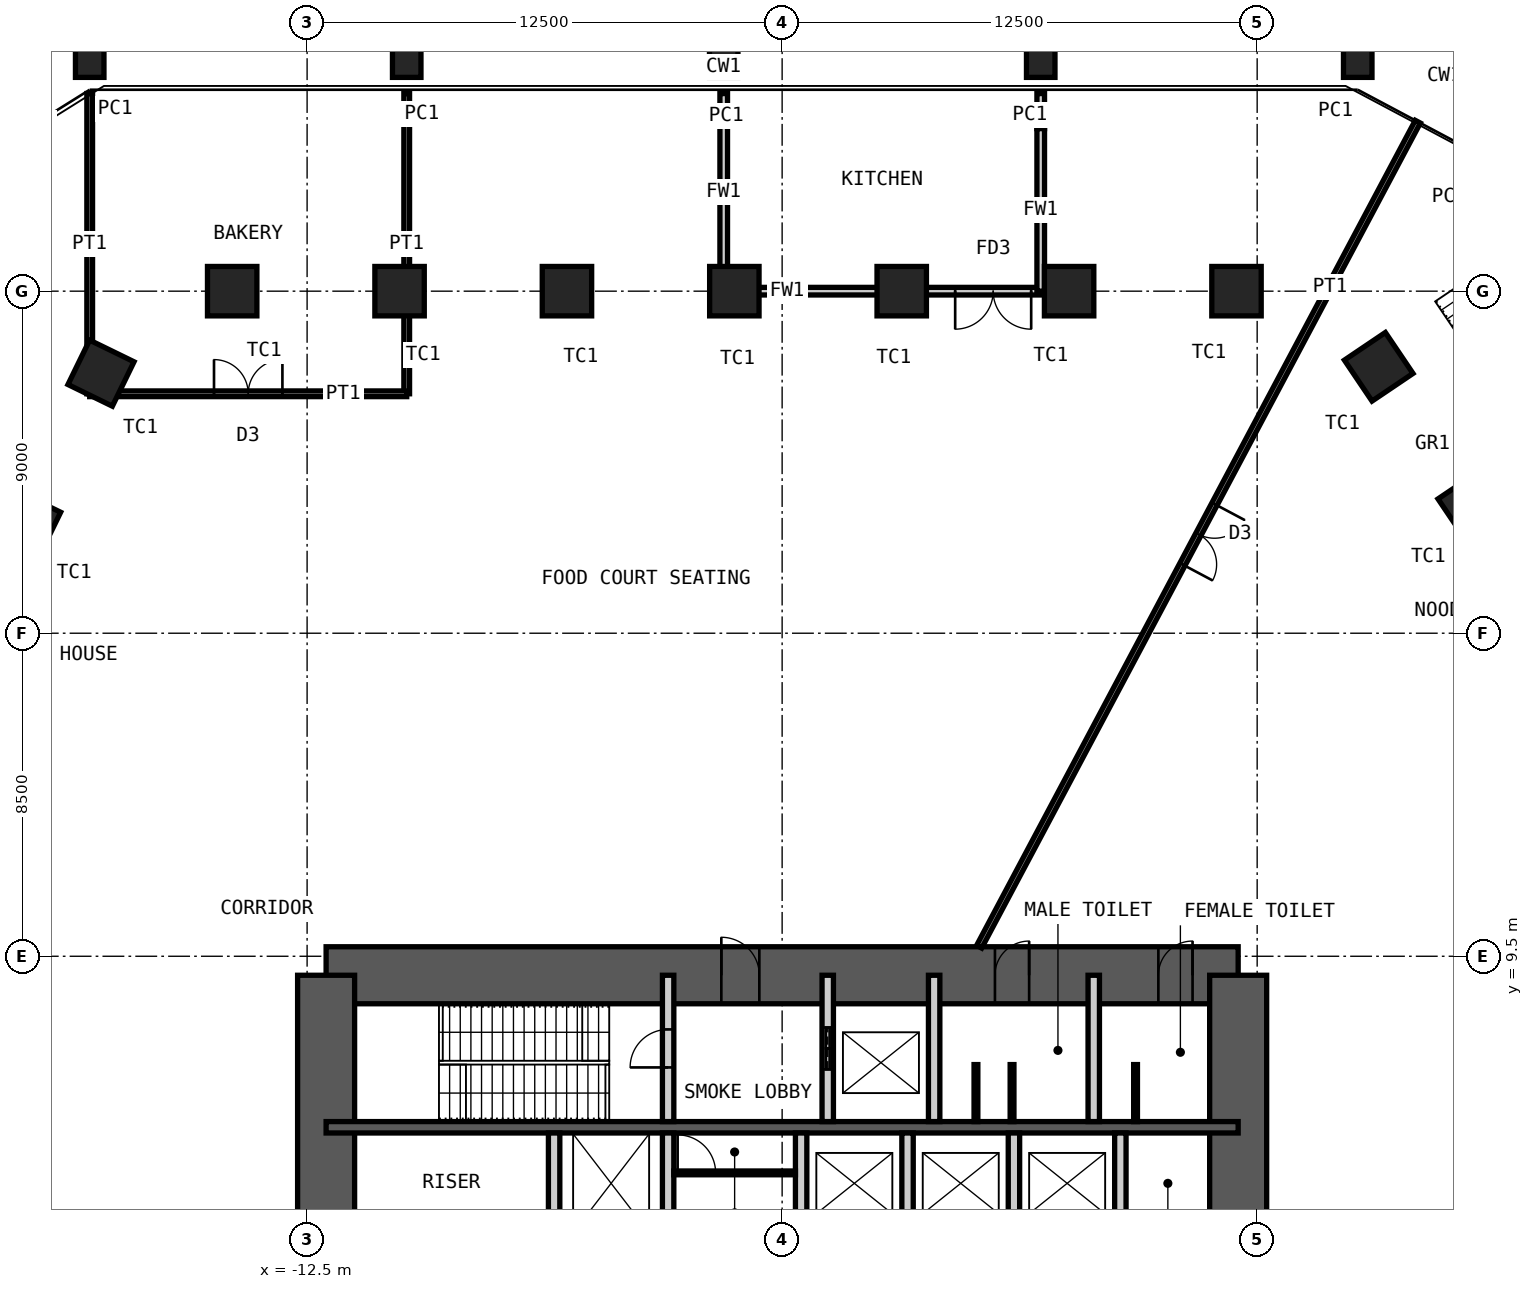
"""IFC4 building model, lengths in metres.
Left out: names, types, materials, properties, quantities, classifications, styles, units other than length and angle.
Written with IfcOpenShell. Run it as: python <this file> out.ifc"""

import sys

from ifc_helpers import new_model, si_unit, direction, frame, frame_2d, origin, origin_2d, place, context, subcontext, project, spatial, rectangle, hollow_rectangle, extrude, element, fill, save


model = new_model("IFC4")
c1 = context("Model", 3, precision=1e-05, world=origin(), true_north=direction((0.0, 1.0)))
c2 = subcontext(c1, "Body", "Model", "MODEL_VIEW")
j1 = project(units=[si_unit("LENGTHUNIT", "METRE"), si_unit("PLANEANGLEUNIT", "RADIAN")], contexts=[c1])
p1 = place(None, origin())
s1 = spatial("IfcSite", under=j1, at=p1, CompositionType="ELEMENT")
p2 = place(p1, origin())
s2 = spatial("IfcBuilding", under=s1, at=p2, CompositionType="ELEMENT")
p3 = place(p2, frame((0.0, 0.0, 6.0)))
s3 = spatial("IfcBuildingStorey", under=s2, at=p3, CompositionType="ELEMENT", Elevation=6.0)
for number, where, z_axis, x_axis in (
    (1, (-14.471, 27.0, 0.0), (0.0, 0.0, 1.0), (-1.0, 0.0, 0.0)),
    (2, (-10.067, 27.0, 0.0), (0.0, 0.0, 1.0), (-1.0, 0.0, 0.0)),
    (3, (-5.662, 27.0, 0.0), (0.0, 0.0, 1.0), (-1.0, 0.0, 0.0)),
    (4, (-1.258, 27.0, 0.0), (0.0, 0.0, 1.0), (-1.0, 0.0, 0.0)),
    (5, (3.147, 27.0, 0.0), (0.0, 0.0, 1.0), (-1.0, 0.0, 0.0)),
    (6, (7.552, 27.0, 0.0), (0.0, 0.0, 1.0), (-1.0, 0.0, 0.0)),
    (7, (11.956, 27.0, 0.0), (0.0, 0.0, 1.0), (-1.0, 0.0, 0.0)),
    (8, (15.698, 25.01, 0.0), (0.0, 0.0, 1.0), (-0.559, 0.829, 0.0)),
    (9, (18.161, 21.359, 0.0), (0.0, 0.0, 1.0), (-0.559, 0.829, 0.0)),
    (10, (-19.854, 20.884, 0.0), (0.0, 0.0, 1.0), (-0.438, -0.899, 0.0)),
    (11, (-17.924, 24.843, 0.0), (0.0, 0.0, 1.0), (-0.438, -0.899, 0.0)),
):
    element("IfcColumn", number, at=place(p3, frame(where, z_axis=z_axis, x_axis=x_axis)), inside=s3, PredefinedType="COLUMN", context=c2, shape_type="SweptSolid", body=[
        extrude(hollow_rectangle(XDim=1.3, YDim=1.3, WallThickness=0.1, at=origin_2d()), origin(), (0.0, 0.0, 1.0), 6.0),
    ])
for number, where, z_axis, x_axis in (
    (12, (-18.221, 33.0, 0.0), (0.0, 0.0, 1.0), (-1.0, 0.0, 0.0)),
    (13, (-9.879, 33.0, 0.0), (0.0, 0.0, 1.0), (-1.0, 0.0, 0.0)),
    (14, (-1.537, 33.0, 0.0), (0.0, 0.0, 1.0), (-1.0, 0.0, 0.0)),
    (15, (6.805, 33.0, 0.0), (0.0, 0.0, 1.0), (-1.0, 0.0, 0.0)),
    (16, (15.146, 33.0, 0.0), (0.0, 0.0, 1.0), (-1.0, 0.0, 0.0)),
):
    element("IfcColumn", number, at=place(p3, frame(where, z_axis=z_axis, x_axis=x_axis)), inside=s3, PredefinedType="COLUMN", context=c2, shape_type="SweptSolid", body=[
        extrude(hollow_rectangle(XDim=0.75, YDim=0.75, WallThickness=0.036, at=origin_2d()), origin(), (0.0, 0.0, 1.0), 6.0),
    ])
p4 = place(p3, frame((-12.0, 9.0, 0.0), z_axis=(0.0, 0.0, 1.0), x_axis=(1.0, 0.0, 0.0)))
e17 = element("IfcWall", 17, at=p4, inside=s3, PredefinedType="SHEAR", context=c2, shape_type="SweptSolid", body=[
    extrude(rectangle(XDim=24.0, YDim=1.5, at=frame_2d((12.0, 0.0))), origin(), (0.0, 0.0, 1.0), 6.0),
])
p5 = place(p4, frame((10.4, 0.0, 0.0)))
e18 = element("IfcOpeningElement", 18, at=p5, cuts=e17, PredefinedType="OPENING", context=c2, shape_type="SweptSolid", body=[
    extrude(rectangle(XDim=1.0, YDim=2.1, at=frame_2d((0.5, 1.05))), frame((0.0, 0.76, 0.0), z_axis=(0.0, -1.0, 0.0), x_axis=(1.0, 0.0, 0.0)), (0.0, 0.0, 1.0), 1.52),
])
p6 = place(p4, frame((17.6, 0.0, 0.0)))
e19 = element("IfcOpeningElement", 19, at=p6, cuts=e17, PredefinedType="OPENING", context=c2, shape_type="SweptSolid", body=[
    extrude(rectangle(XDim=0.9, YDim=2.1, at=frame_2d((0.45, 1.05))), frame((0.0, 0.76, 0.0), z_axis=(0.0, -1.0, 0.0), x_axis=(1.0, 0.0, 0.0)), (0.0, 0.0, 1.0), 1.52),
])
p7 = place(p4, frame((21.9, 0.0, 0.0)))
e20 = element("IfcOpeningElement", 20, at=p7, cuts=e17, PredefinedType="OPENING", context=c2, shape_type="SweptSolid", body=[
    extrude(rectangle(XDim=0.9, YDim=2.1, at=frame_2d((0.45, 1.05))), frame((0.0, 0.76, 0.0), z_axis=(0.0, -1.0, 0.0), x_axis=(1.0, 0.0, 0.0)), (0.0, 0.0, 1.0), 1.52),
])
p8 = place(p3, frame((12.0, -9.0, 0.0), z_axis=(0.0, 0.0, 1.0), x_axis=(0.0, 1.0, 0.0)))
e21 = element("IfcWall", 21, at=p8, inside=s3, PredefinedType="SHEAR", context=c2, shape_type="SweptSolid", body=[
    extrude(rectangle(XDim=18.0, YDim=1.5, at=frame_2d((9.0, 0.0))), origin(), (0.0, 0.0, 1.0), 6.0),
])
p9 = place(p8, frame((8.1, 0.0, 0.0)))
e22 = element("IfcOpeningElement", 22, at=p9, cuts=e21, PredefinedType="OPENING", context=c2, shape_type="SweptSolid", body=[
    extrude(rectangle(XDim=1.8, YDim=2.1, at=frame_2d((0.9, 1.05))), frame((0.0, 0.76, 0.0), z_axis=(0.0, -1.0, 0.0), x_axis=(1.0, 0.0, 0.0)), (0.0, 0.0, 1.0), 1.52),
])
p10 = place(p3, frame((-12.0, -9.0, 0.0), z_axis=(0.0, 0.0, 1.0), x_axis=(0.0, 1.0, 0.0)))
e23 = element("IfcWall", 23, at=p10, inside=s3, PredefinedType="SHEAR", context=c2, shape_type="SweptSolid", body=[
    extrude(rectangle(XDim=18.0, YDim=1.5, at=frame_2d((9.0, 0.0))), origin(), (0.0, 0.0, 1.0), 6.0),
])
p11 = place(p10, frame((8.1, 0.0, 0.0)))
e24 = element("IfcOpeningElement", 24, at=p11, cuts=e23, PredefinedType="OPENING", context=c2, shape_type="SweptSolid", body=[
    extrude(rectangle(XDim=1.8, YDim=2.1, at=frame_2d((0.9, 1.05))), frame((0.0, 0.76, 0.0), z_axis=(0.0, -1.0, 0.0), x_axis=(1.0, 0.0, 0.0)), (0.0, 0.0, 1.0), 1.52),
])
p12 = place(p3, frame((-12.0, 5.0, 0.0), z_axis=(0.0, 0.0, 1.0), x_axis=(1.0, 0.0, 0.0)))
e25 = element("IfcWall", 25, at=p12, inside=s3, PredefinedType="SHEAR", context=c2, shape_type="SweptSolid", body=[
    extrude(rectangle(XDim=24.0, YDim=0.3, at=frame_2d((12.0, 0.0))), origin(), (0.0, 0.0, 1.0), 6.0),
])
p13 = place(p3, frame((-3.0, 5.15, 0.0), z_axis=(0.0, 0.0, 1.0), x_axis=(0.0, 1.0, 0.0)))
e26 = element("IfcWall", 26, at=p13, inside=s3, PredefinedType="PARTITIONING", context=c2, shape_type="SweptSolid", body=[
    extrude(rectangle(XDim=3.85, YDim=0.3, at=frame_2d((1.925, 0.0))), origin(), (0.0, 0.0, 1.0), 5.78),
])
p14 = place(p13, frame((1.425, 0.0, 0.0)))
e27 = element("IfcOpeningElement", 27, at=p14, cuts=e26, PredefinedType="OPENING", context=c2, shape_type="SweptSolid", body=[
    extrude(rectangle(XDim=1.0, YDim=2.1, at=frame_2d((0.5, 1.05))), frame((0.0, 0.16, 0.0), z_axis=(0.0, -1.0, 0.0), x_axis=(1.0, 0.0, 0.0)), (0.0, 0.0, 1.0), 0.32),
])
p15 = place(p3, frame((1.2, 5.15, 0.0), z_axis=(0.0, 0.0, 1.0), x_axis=(0.0, 1.0, 0.0)))
e28 = element("IfcWall", 28, at=p15, inside=s3, PredefinedType="PARTITIONING", context=c2, shape_type="SweptSolid", body=[
    extrude(rectangle(XDim=3.85, YDim=0.3, at=frame_2d((1.925, 0.0))), origin(), (0.0, 0.0, 1.0), 5.78),
])
p16 = place(p15, frame((1.375, 0.0, 0.0)))
e29 = element("IfcOpeningElement", 29, at=p16, cuts=e28, PredefinedType="OPENING", context=c2, shape_type="SweptSolid", body=[
    extrude(rectangle(XDim=1.1, YDim=2.4, at=frame_2d((0.55, 1.2))), frame((0.0, 0.16, 0.0), z_axis=(0.0, -1.0, 0.0), x_axis=(1.0, 0.0, 0.0)), (0.0, 0.0, 1.0), 0.32),
])
for number, where, z_axis, x_axis in (
    (30, (4.0, 5.15, 0.0), (0.0, 0.0, 1.0), (0.0, 1.0, 0.0)),
    (31, (8.2, 5.15, 0.0), (0.0, 0.0, 1.0), (0.0, 1.0, 0.0)),
):
    element("IfcWall", number, at=place(p3, frame(where, z_axis=z_axis, x_axis=x_axis)), inside=s3, PredefinedType="PARTITIONING", context=c2, shape_type="SweptSolid", body=[
        extrude(rectangle(XDim=3.85, YDim=0.3, at=frame_2d((1.925, 0.0))), origin(), (0.0, 0.0, 1.0), 5.78),
    ])
for number, where, z_axis, x_axis in (
    (32, (-6.0, 2.2, 0.0), (0.0, 0.0, 1.0), (0.0, 1.0, 0.0)),
    (33, (-3.0, 2.2, 0.0), (0.0, 0.0, 1.0), (0.0, 1.0, 0.0)),
    (34, (0.5, 2.2, 0.0), (0.0, 0.0, 1.0), (0.0, 1.0, 0.0)),
    (35, (3.3, 2.2, 0.0), (0.0, 0.0, 1.0), (0.0, 1.0, 0.0)),
    (36, (6.1, 2.2, 0.0), (0.0, 0.0, 1.0), (0.0, 1.0, 0.0)),
    (37, (8.9, 2.2, 0.0), (0.0, 0.0, 1.0), (0.0, 1.0, 0.0)),
):
    element("IfcWall", number, at=place(p3, frame(where, z_axis=z_axis, x_axis=x_axis)), inside=s3, PredefinedType="PARTITIONING", context=c2, shape_type="SweptSolid", body=[
        extrude(rectangle(XDim=2.65, YDim=0.3, at=frame_2d((1.325, 0.0))), origin(), (0.0, 0.0, 1.0), 5.78),
    ])
p17 = place(p3, frame((-2.85, 3.8, 0.0), z_axis=(0.0, 0.0, 1.0), x_axis=(1.0, 0.0, 0.0)))
e38 = element("IfcWall", 38, at=p17, inside=s3, PredefinedType="PARTITIONING", context=c2, shape_type="SweptSolid", body=[
    extrude(rectangle(XDim=3.2, YDim=0.1, at=frame_2d((1.6, 0.0))), origin(), (0.0, 0.0, 1.0), 5.78),
])
p18 = place(p17, frame((0.1, 0.0, 0.0)))
e39 = element("IfcOpeningElement", 39, at=p18, cuts=e38, PredefinedType="OPENING", context=c2, shape_type="SweptSolid", body=[
    extrude(rectangle(XDim=1.0, YDim=2.4, at=frame_2d((0.5, 1.2))), frame((0.0, 0.06, 0.0), z_axis=(0.0, -1.0, 0.0), x_axis=(1.0, 0.0, 0.0)), (0.0, 0.0, 1.0), 0.12),
])
for number, where, z_axis, x_axis in (
    (40, (5.1, 5.15, 0.0), (0.0, 0.0, 1.0), (0.0, 1.0, 0.0)),
    (41, (6.05, 5.15, 0.0), (0.0, 0.0, 1.0), (0.0, 1.0, 0.0)),
    (42, (9.3, 5.15, 0.0), (0.0, 0.0, 1.0), (0.0, 1.0, 0.0)),
):
    element("IfcWall", number, at=place(p3, frame(where, z_axis=z_axis, x_axis=x_axis)), inside=s3, PredefinedType="PARTITIONING", context=c2, shape_type="SweptSolid", body=[
        extrude(rectangle(XDim=1.5, YDim=0.1, at=frame_2d((0.75, 0.0))), origin(), (0.0, 0.0, 1.0), 2.1),
    ])
p19 = place(p3, frame((-1.537, 32.2, 0.0), z_axis=(0.0, 0.0, 1.0), x_axis=(0.0, -1.0, 0.0)))
e43 = element("IfcWall", 43, at=p19, inside=s3, PredefinedType="PARTITIONING", context=c2, shape_type="SweptSolid", body=[
    extrude(rectangle(XDim=5.2, YDim=0.2, at=frame_2d((2.6, 0.0))), origin(), (0.0, 0.0, 1.0), 4.65),
])
p20 = place(p3, frame((6.805, 32.2, 0.0), z_axis=(0.0, 0.0, 1.0), x_axis=(0.0, -1.0, 0.0)))
e44 = element("IfcWall", 44, at=p20, inside=s3, PredefinedType="PARTITIONING", context=c2, shape_type="SweptSolid", body=[
    extrude(rectangle(XDim=0.923, YDim=0.2, at=frame_2d((0.461, 0.0))), origin(), (0.0, 0.0, 1.0), 4.65),
])
p21 = place(p3, frame((-1.537, 27.0, 0.0), z_axis=(0.0, 0.0, 1.0), x_axis=(1.0, 0.0, 0.0)))
e45 = element("IfcWall", 45, at=p21, inside=s3, PredefinedType="PARTITIONING", context=c2, shape_type="SweptSolid", body=[
    extrude(rectangle(XDim=8.342, YDim=0.2, at=frame_2d((4.171, 0.0))), origin(), (0.0, 0.0, 1.0), 4.55),
])
p22 = place(p21, frame((6.091, 0.0, 0.0)))
e46 = element("IfcOpeningElement", 46, at=p22, cuts=e45, PredefinedType="OPENING", context=c2, shape_type="SweptSolid", body=[
    extrude(rectangle(XDim=2.0, YDim=2.4, at=frame_2d((1.0, 1.2))), frame((0.0, 0.11, 0.0), z_axis=(0.0, -1.0, 0.0), x_axis=(1.0, 0.0, 0.0)), (0.0, 0.0, 1.0), 0.22),
])
for number, where, z_axis, x_axis in (
    (47, (-18.221, 32.2, 0.0), (0.0, 0.0, 1.0), (0.0, -1.0, 0.0)),
    (48, (-9.879, 32.2, 0.0), (0.0, 0.0, 1.0), (0.0, -1.0, 0.0)),
):
    element("IfcWall", number, at=place(p3, frame(where, z_axis=z_axis, x_axis=x_axis)), inside=s3, PredefinedType="PARTITIONING", context=c2, shape_type="SweptSolid", body=[
        extrude(rectangle(XDim=7.9, YDim=0.15, at=frame_2d((3.95, 0.0))), origin(), (0.0, 0.0, 1.0), 5.75),
    ])
p23 = place(p3, frame((-18.221, 24.3, 0.0), z_axis=(0.0, 0.0, 1.0), x_axis=(1.0, 0.0, 0.0)))
e49 = element("IfcWall", 49, at=p23, inside=s3, PredefinedType="PARTITIONING", context=c2, shape_type="SweptSolid", body=[
    extrude(rectangle(XDim=8.342, YDim=0.15, at=frame_2d((4.171, 0.0))), origin(), (0.0, 0.0, 1.0), 5.75),
])
p24 = place(p23, frame((3.271, 0.0, 0.0)))
e50 = element("IfcOpeningElement", 50, at=p24, cuts=e49, PredefinedType="OPENING", context=c2, shape_type="SweptSolid", body=[
    extrude(rectangle(XDim=1.8, YDim=2.4, at=frame_2d((0.9, 1.2))), frame((0.0, 0.085, 0.0), z_axis=(0.0, -1.0, 0.0), x_axis=(1.0, 0.0, 0.0)), (0.0, 0.0, 1.0), 0.17),
])
p25 = place(p3, frame((5.184, 9.75, 0.0), z_axis=(0.0, 0.0, 1.0), x_axis=(0.469474147629, 0.882946218469, 0.0)))
e51 = element("IfcWall", 51, at=p25, inside=s3, PredefinedType="PARTITIONING", context=c2, shape_type="SweptSolid", body=[
    extrude(rectangle(XDim=24.588, YDim=0.15, at=frame_2d((12.294, 0.0))), origin(), (0.0, 0.0, 1.0), 5.75),
])
p26 = place(p25, frame((11.394, 0.0, 0.0)))
e52 = element("IfcOpeningElement", 52, at=p26, cuts=e51, PredefinedType="OPENING", context=c2, shape_type="SweptSolid", body=[
    extrude(rectangle(XDim=1.8, YDim=2.4, at=frame_2d((0.9, 1.2))), frame((0.0, 0.085, 0.0), z_axis=(0.0, -1.0, 0.0), x_axis=(1.0, 0.0, 0.0)), (0.0, 0.0, 1.0), 0.17),
])
p27 = place(p3, frame((6.805, 31.277, 0.0), z_axis=(0.0, 0.0, 1.0), x_axis=(0.0, -1.0, 0.0)))
e53 = element("IfcWall", 53, at=p27, inside=s3, PredefinedType="PARTITIONING", context=c2, shape_type="SweptSolid", body=[
    extrude(rectangle(XDim=4.277, YDim=0.2, at=frame_2d((2.139, 0.0))), origin(), (0.0, 0.0, 1.0), 5.75),
])
p28 = place(p5, origin())
e54 = element("IfcDoor", 54, at=p28, inside=s3, OperationType="SINGLE_SWING_RIGHT", PredefinedType="DOOR", context=c2, shape_type="SweptSolid", body=[
    extrude(rectangle(XDim=1.0, YDim=2.1, at=frame_2d((0.5, 1.05))), frame((0.0, 0.025, 0.0), z_axis=(0.0, -1.0, 0.0), x_axis=(1.0, 0.0, 0.0)), (0.0, 0.0, 1.0), 0.05),
])
fill(e18, e54)
p29 = place(p6, origin())
e55 = element("IfcDoor", 55, at=p29, inside=s3, OperationType="SINGLE_SWING_LEFT", PredefinedType="DOOR", context=c2, shape_type="SweptSolid", body=[
    extrude(rectangle(XDim=0.9, YDim=2.1, at=frame_2d((0.45, 1.05))), frame((0.0, 0.025, 0.0), z_axis=(0.0, -1.0, 0.0), x_axis=(1.0, 0.0, 0.0)), (0.0, 0.0, 1.0), 0.05),
])
fill(e19, e55)
p30 = place(p7, origin())
e56 = element("IfcDoor", 56, at=p30, inside=s3, OperationType="SINGLE_SWING_LEFT", PredefinedType="DOOR", context=c2, shape_type="SweptSolid", body=[
    extrude(rectangle(XDim=0.9, YDim=2.1, at=frame_2d((0.45, 1.05))), frame((0.0, 0.025, 0.0), z_axis=(0.0, -1.0, 0.0), x_axis=(1.0, 0.0, 0.0)), (0.0, 0.0, 1.0), 0.05),
])
fill(e20, e56)
p31 = place(p14, origin())
e57 = element("IfcDoor", 57, at=p31, inside=s3, OperationType="SINGLE_SWING_RIGHT", PredefinedType="DOOR", context=c2, shape_type="SweptSolid", body=[
    extrude(rectangle(XDim=1.0, YDim=2.1, at=frame_2d((0.5, 1.05))), frame((0.0, 0.025, 0.0), z_axis=(0.0, -1.0, 0.0), x_axis=(1.0, 0.0, 0.0)), (0.0, 0.0, 1.0), 0.05),
])
fill(e27, e57)
p32 = place(p16, origin())
e58 = element("IfcDoor", 58, at=p32, inside=s3, OperationType="DOUBLE_DOOR_SLIDING", PredefinedType="DOOR", context=c2, shape_type="SweptSolid", body=[
    extrude(rectangle(XDim=1.1, YDim=2.4, at=frame_2d((0.55, 1.2))), frame((0.0, 0.025, 0.0), z_axis=(0.0, -1.0, 0.0), x_axis=(1.0, 0.0, 0.0)), (0.0, 0.0, 1.0), 0.05),
])
fill(e29, e58)
p33 = place(p18, origin())
e59 = element("IfcDoor", 59, at=p33, inside=s3, OperationType="SINGLE_SWING_RIGHT", PredefinedType="DOOR", context=c2, shape_type="SweptSolid", body=[
    extrude(rectangle(XDim=1.0, YDim=2.4, at=frame_2d((0.5, 1.2))), frame((0.0, 0.025, 0.0), z_axis=(0.0, -1.0, 0.0), x_axis=(1.0, 0.0, 0.0)), (0.0, 0.0, 1.0), 0.05),
])
fill(e39, e59)
p34 = place(p22, origin())
e60 = element("IfcDoor", 60, at=p34, inside=s3, OperationType="DOUBLE_DOOR_DOUBLE_SWING", PredefinedType="DOOR", context=c2, shape_type="SweptSolid", body=[
    extrude(rectangle(XDim=2.0, YDim=2.4, at=frame_2d((1.0, 1.2))), frame((0.0, 0.025, 0.0), z_axis=(0.0, -1.0, 0.0), x_axis=(1.0, 0.0, 0.0)), (0.0, 0.0, 1.0), 0.05),
])
fill(e46, e60)
p35 = place(p24, origin())
e61 = element("IfcDoor", 61, at=p35, inside=s3, OperationType="DOUBLE_DOOR_DOUBLE_SWING", PredefinedType="DOOR", context=c2, shape_type="SweptSolid", body=[
    extrude(rectangle(XDim=1.8, YDim=2.4, at=frame_2d((0.9, 1.2))), frame((0.0, 0.025, 0.0), z_axis=(0.0, -1.0, 0.0), x_axis=(1.0, 0.0, 0.0)), (0.0, 0.0, 1.0), 0.05),
])
fill(e50, e61)
p36 = place(p26, origin())
e62 = element("IfcDoor", 62, at=p36, inside=s3, OperationType="DOUBLE_DOOR_DOUBLE_SWING", PredefinedType="DOOR", context=c2, shape_type="SweptSolid", body=[
    extrude(rectangle(XDim=1.8, YDim=2.4, at=frame_2d((0.9, 1.2))), frame((0.0, 0.025, 0.0), z_axis=(0.0, -1.0, 0.0), x_axis=(1.0, 0.0, 0.0)), (0.0, 0.0, 1.0), 0.05),
])
fill(e52, e62)
save(model, sys.argv[1])
